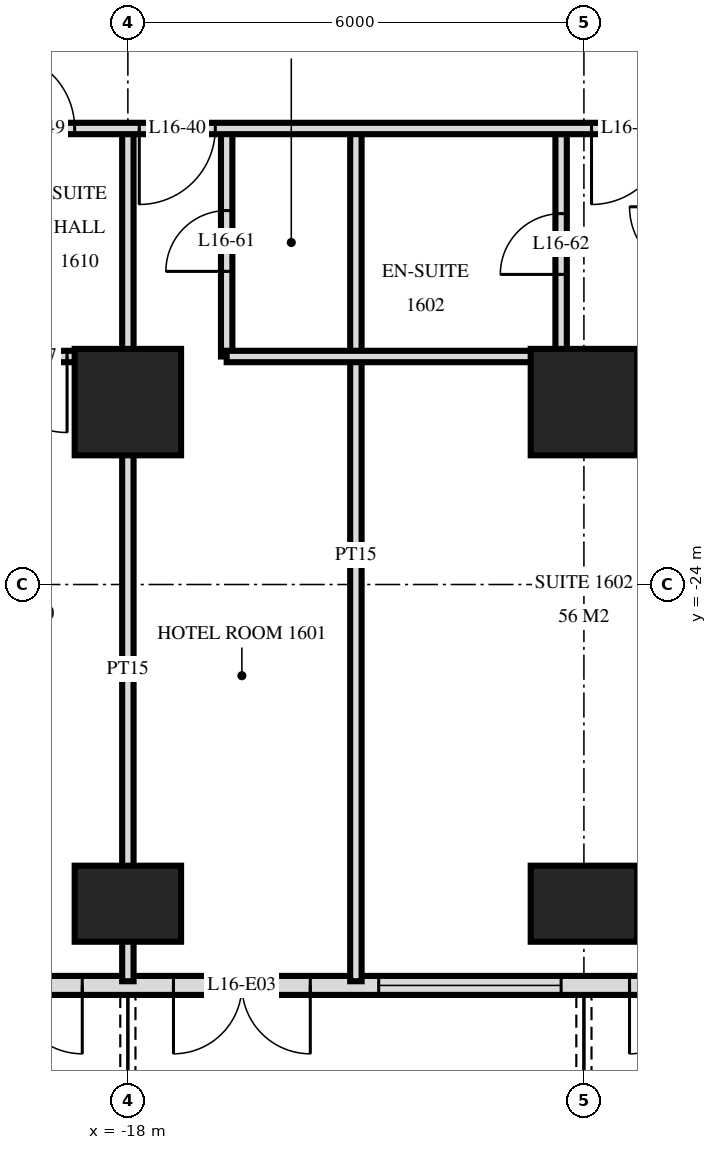
"""IFC4 building model, lengths in metres.
Left out: names, types, materials, properties, quantities, classifications, styles, units other than length and angle.
Written with IfcOpenShell. Run it as: python <this file> out.ifc"""

import sys

from ifc_helpers import new_model, si_unit, direction, frame, frame_2d, origin, origin_2d, place, context, subcontext, project, spatial, rectangle, extrude, element, fill, save


model = new_model("IFC4")
c1 = context("Model", 3, precision=1e-05, world=origin(), true_north=direction((0.0, 1.0)))
c2 = subcontext(c1, "Body", "Model", "MODEL_VIEW")
j1 = project(units=[si_unit("LENGTHUNIT", "METRE"), si_unit("PLANEANGLEUNIT", "RADIAN")], contexts=[c1])
p1 = place(None, origin())
s1 = spatial("IfcSite", under=j1, at=p1, CompositionType="ELEMENT")
p2 = place(p1, origin())
s2 = spatial("IfcBuilding", under=s1, at=p2, CompositionType="ELEMENT")
p3 = place(p2, frame((0.0, 0.0, 67.2)))
s3 = spatial("IfcBuildingStorey", under=s2, at=p3, CompositionType="ELEMENT", Elevation=67.2)
p4 = place(p3, frame((-18.0, -28.2, 0.0), z_axis=(0.0, 0.0, 1.0), x_axis=(1.0, 0.0, 0.0)))
e1 = element("IfcColumn", 1, at=p4, inside=s3, PredefinedType="COLUMN", context=c2, shape_type="SweptSolid", body=[
    extrude(rectangle(XDim=1.4, YDim=1.0, at=origin_2d()), origin(), (0.0, 0.0, 1.0), 3.6),
])
p5 = place(p3, frame((-18.0, -21.6, 0.0), z_axis=(0.0, 0.0, 1.0), x_axis=(1.0, 0.0, 0.0)))
e2 = element("IfcColumn", 2, at=p5, inside=s3, PredefinedType="COLUMN", context=c2, shape_type="SweptSolid", body=[
    extrude(rectangle(XDim=1.4, YDim=1.4, at=origin_2d()), origin(), (0.0, 0.0, 1.0), 3.6),
])
p6 = place(p3, frame((-12.0, -28.2, 0.0), z_axis=(0.0, 0.0, 1.0), x_axis=(1.0, 0.0, 0.0)))
e3 = element("IfcColumn", 3, at=p6, inside=s3, PredefinedType="COLUMN", context=c2, shape_type="SweptSolid", body=[
    extrude(rectangle(XDim=1.4, YDim=1.0, at=origin_2d()), origin(), (0.0, 0.0, 1.0), 3.6),
])
p7 = place(p3, frame((-12.0, -21.6, 0.0), z_axis=(0.0, 0.0, 1.0), x_axis=(1.0, 0.0, 0.0)))
e4 = element("IfcColumn", 4, at=p7, inside=s3, PredefinedType="COLUMN", context=c2, shape_type="SweptSolid", body=[
    extrude(rectangle(XDim=1.4, YDim=1.4, at=origin_2d()), origin(), (0.0, 0.0, 1.0), 3.6),
])
p8 = place(p3, frame((-28.775, -29.275, 0.0), z_axis=(0.0, 0.0, 1.0), x_axis=(1.0, 0.0, 0.0)))
e5 = element("IfcWall", 5, at=p8, inside=s3, PredefinedType="SOLIDWALL", context=c2, shape_type="SweptSolid", body=[
    extrude(rectangle(XDim=57.551, YDim=0.25, at=frame_2d((28.775, 0.0))), origin(), (0.0, 0.0, 1.0), 3.32),
])
p9 = place(p8, frame((0.575, 0.0, 0.0)))
e6 = element("IfcOpeningElement", 6, at=p9, cuts=e5, PredefinedType="OPENING", context=c2, shape_type="SweptSolid", body=[
    extrude(rectangle(XDim=1.8, YDim=2.4, at=frame_2d((0.9, 1.2))), frame((0.0, 0.135, 0.0), z_axis=(0.0, -1.0, 0.0), x_axis=(1.0, 0.0, 0.0)), (0.0, 0.0, 1.0), 0.27),
])
p10 = place(p8, frame((5.075, 0.0, 0.3)))
e7 = element("IfcOpeningElement", 7, at=p10, cuts=e5, PredefinedType="OPENING", context=c2, shape_type="SweptSolid", body=[
    extrude(rectangle(XDim=2.4, YDim=2.1, at=frame_2d((1.2, 1.05))), frame((0.0, 0.135, 0.0), z_axis=(0.0, -1.0, 0.0), x_axis=(1.0, 0.0, 0.0)), (0.0, 0.0, 1.0), 0.27),
])
p11 = place(p8, frame((8.375, 0.0, 0.0)))
e8 = element("IfcOpeningElement", 8, at=p11, cuts=e5, PredefinedType="OPENING", context=c2, shape_type="SweptSolid", body=[
    extrude(rectangle(XDim=1.8, YDim=2.4, at=frame_2d((0.9, 1.2))), frame((0.0, 0.135, 0.0), z_axis=(0.0, -1.0, 0.0), x_axis=(1.0, 0.0, 0.0)), (0.0, 0.0, 1.0), 0.27),
])
p12 = place(p8, frame((11.375, 0.0, 0.0)))
e9 = element("IfcOpeningElement", 9, at=p12, cuts=e5, PredefinedType="OPENING", context=c2, shape_type="SweptSolid", body=[
    extrude(rectangle(XDim=1.8, YDim=2.4, at=frame_2d((0.9, 1.2))), frame((0.0, 0.135, 0.0), z_axis=(0.0, -1.0, 0.0), x_axis=(1.0, 0.0, 0.0)), (0.0, 0.0, 1.0), 0.27),
])
p13 = place(p8, frame((14.075, 0.0, 0.3)))
e10 = element("IfcOpeningElement", 10, at=p13, cuts=e5, PredefinedType="OPENING", context=c2, shape_type="SweptSolid", body=[
    extrude(rectangle(XDim=2.4, YDim=2.1, at=frame_2d((1.2, 1.05))), frame((0.0, 0.135, 0.0), z_axis=(0.0, -1.0, 0.0), x_axis=(1.0, 0.0, 0.0)), (0.0, 0.0, 1.0), 0.27),
])
p14 = place(p8, frame((17.375, 0.0, 0.0)))
e11 = element("IfcOpeningElement", 11, at=p14, cuts=e5, PredefinedType="OPENING", context=c2, shape_type="SweptSolid", body=[
    extrude(rectangle(XDim=1.8, YDim=2.4, at=frame_2d((0.9, 1.2))), frame((0.0, 0.135, 0.0), z_axis=(0.0, -1.0, 0.0), x_axis=(1.0, 0.0, 0.0)), (0.0, 0.0, 1.0), 0.27),
])
p15 = place(p8, frame((20.075, 0.0, 0.3)))
e12 = element("IfcOpeningElement", 12, at=p15, cuts=e5, PredefinedType="OPENING", context=c2, shape_type="SweptSolid", body=[
    extrude(rectangle(XDim=2.4, YDim=2.1, at=frame_2d((1.2, 1.05))), frame((0.0, 0.135, 0.0), z_axis=(0.0, -1.0, 0.0), x_axis=(1.0, 0.0, 0.0)), (0.0, 0.0, 1.0), 0.27),
])
p16 = place(p8, frame((23.075, 0.0, 0.3)))
e13 = element("IfcOpeningElement", 13, at=p16, cuts=e5, PredefinedType="OPENING", context=c2, shape_type="SweptSolid", body=[
    extrude(rectangle(XDim=2.4, YDim=2.1, at=frame_2d((1.2, 1.05))), frame((0.0, 0.135, 0.0), z_axis=(0.0, -1.0, 0.0), x_axis=(1.0, 0.0, 0.0)), (0.0, 0.0, 1.0), 0.27),
])
p17 = place(p8, frame((26.375, 0.0, 0.0)))
e14 = element("IfcOpeningElement", 14, at=p17, cuts=e5, PredefinedType="OPENING", context=c2, shape_type="SweptSolid", body=[
    extrude(rectangle(XDim=1.8, YDim=2.4, at=frame_2d((0.9, 1.2))), frame((0.0, 0.135, 0.0), z_axis=(0.0, -1.0, 0.0), x_axis=(1.0, 0.0, 0.0)), (0.0, 0.0, 1.0), 0.27),
])
p18 = place(p8, frame((29.375, 0.0, 0.0)))
e15 = element("IfcOpeningElement", 15, at=p18, cuts=e5, PredefinedType="OPENING", context=c2, shape_type="SweptSolid", body=[
    extrude(rectangle(XDim=1.8, YDim=2.4, at=frame_2d((0.9, 1.2))), frame((0.0, 0.135, 0.0), z_axis=(0.0, -1.0, 0.0), x_axis=(1.0, 0.0, 0.0)), (0.0, 0.0, 1.0), 0.27),
])
p19 = place(p8, frame((32.075, 0.0, 0.3)))
e16 = element("IfcOpeningElement", 16, at=p19, cuts=e5, PredefinedType="OPENING", context=c2, shape_type="SweptSolid", body=[
    extrude(rectangle(XDim=2.4, YDim=2.1, at=frame_2d((1.2, 1.05))), frame((0.0, 0.135, 0.0), z_axis=(0.0, -1.0, 0.0), x_axis=(1.0, 0.0, 0.0)), (0.0, 0.0, 1.0), 0.27),
])
p20 = place(p8, frame((35.375, 0.0, 0.0)))
e17 = element("IfcOpeningElement", 17, at=p20, cuts=e5, PredefinedType="OPENING", context=c2, shape_type="SweptSolid", body=[
    extrude(rectangle(XDim=1.8, YDim=2.4, at=frame_2d((0.9, 1.2))), frame((0.0, 0.135, 0.0), z_axis=(0.0, -1.0, 0.0), x_axis=(1.0, 0.0, 0.0)), (0.0, 0.0, 1.0), 0.27),
])
p21 = place(p8, frame((38.075, 0.0, 0.3)))
e18 = element("IfcOpeningElement", 18, at=p21, cuts=e5, PredefinedType="OPENING", context=c2, shape_type="SweptSolid", body=[
    extrude(rectangle(XDim=2.4, YDim=2.1, at=frame_2d((1.2, 1.05))), frame((0.0, 0.135, 0.0), z_axis=(0.0, -1.0, 0.0), x_axis=(1.0, 0.0, 0.0)), (0.0, 0.0, 1.0), 0.27),
])
p22 = place(p8, frame((41.075, 0.0, 0.3)))
e19 = element("IfcOpeningElement", 19, at=p22, cuts=e5, PredefinedType="OPENING", context=c2, shape_type="SweptSolid", body=[
    extrude(rectangle(XDim=2.4, YDim=2.1, at=frame_2d((1.2, 1.05))), frame((0.0, 0.135, 0.0), z_axis=(0.0, -1.0, 0.0), x_axis=(1.0, 0.0, 0.0)), (0.0, 0.0, 1.0), 0.27),
])
p23 = place(p8, frame((44.375, 0.0, 0.0)))
e20 = element("IfcOpeningElement", 20, at=p23, cuts=e5, PredefinedType="OPENING", context=c2, shape_type="SweptSolid", body=[
    extrude(rectangle(XDim=1.8, YDim=2.4, at=frame_2d((0.9, 1.2))), frame((0.0, 0.135, 0.0), z_axis=(0.0, -1.0, 0.0), x_axis=(1.0, 0.0, 0.0)), (0.0, 0.0, 1.0), 0.27),
])
p24 = place(p8, frame((47.075, 0.0, 0.3)))
e21 = element("IfcOpeningElement", 21, at=p24, cuts=e5, PredefinedType="OPENING", context=c2, shape_type="SweptSolid", body=[
    extrude(rectangle(XDim=2.4, YDim=2.1, at=frame_2d((1.2, 1.05))), frame((0.0, 0.135, 0.0), z_axis=(0.0, -1.0, 0.0), x_axis=(1.0, 0.0, 0.0)), (0.0, 0.0, 1.0), 0.27),
])
p25 = place(p8, frame((50.375, 0.0, 0.0)))
e22 = element("IfcOpeningElement", 22, at=p25, cuts=e5, PredefinedType="OPENING", context=c2, shape_type="SweptSolid", body=[
    extrude(rectangle(XDim=1.8, YDim=2.4, at=frame_2d((0.9, 1.2))), frame((0.0, 0.135, 0.0), z_axis=(0.0, -1.0, 0.0), x_axis=(1.0, 0.0, 0.0)), (0.0, 0.0, 1.0), 0.27),
])
p26 = place(p8, frame((53.375, 0.0, 0.0)))
e23 = element("IfcOpeningElement", 23, at=p26, cuts=e5, PredefinedType="OPENING", context=c2, shape_type="SweptSolid", body=[
    extrude(rectangle(XDim=1.8, YDim=2.4, at=frame_2d((0.9, 1.2))), frame((0.0, 0.135, 0.0), z_axis=(0.0, -1.0, 0.0), x_axis=(1.0, 0.0, 0.0)), (0.0, 0.0, 1.0), 0.27),
])
p27 = place(p3, frame((-12.3, -21.0, 0.0), z_axis=(0.0, 0.0, 1.0), x_axis=(0.0, 1.0, 0.0)))
e24 = element("IfcWall", 24, at=p27, inside=s3, PredefinedType="PARTITIONING", context=c2, shape_type="SweptSolid", body=[
    extrude(rectangle(XDim=3.0, YDim=0.15, at=frame_2d((1.5, 0.0))), origin(), (0.0, 0.0, 1.0), 3.32),
])
p28 = place(p27, frame((1.08, 0.0, 0.0)))
e25 = element("IfcOpeningElement", 25, at=p28, cuts=e24, PredefinedType="OPENING", context=c2, shape_type="SweptSolid", body=[
    extrude(rectangle(XDim=0.8, YDim=2.1, at=frame_2d((0.4, 1.05))), frame((0.0, 0.085, 0.0), z_axis=(0.0, -1.0, 0.0), x_axis=(1.0, 0.0, 0.0)), (0.0, 0.0, 1.0), 0.17),
])
p29 = place(p3, frame((-15.0, -29.22, 0.0), z_axis=(0.0, 0.0, 1.0), x_axis=(0.0, 1.0, 0.0)))
e26 = element("IfcWall", 26, at=p29, inside=s3, PredefinedType="PARTITIONING", context=c2, shape_type="SweptSolid", body=[
    extrude(rectangle(XDim=11.22, YDim=0.15, at=frame_2d((5.61, 0.0))), origin(), (0.0, 0.0, 1.0), 3.32),
])
p30 = place(p3, frame((-16.7, -21.0, 0.0), z_axis=(0.0, 0.0, 1.0), x_axis=(0.0, 1.0, 0.0)))
e27 = element("IfcWall", 27, at=p30, inside=s3, PredefinedType="PARTITIONING", context=c2, shape_type="SweptSolid", body=[
    extrude(rectangle(XDim=3.0, YDim=0.15, at=frame_2d((1.5, 0.0))), origin(), (0.0, 0.0, 1.0), 3.32),
])
p31 = place(p30, frame((1.12, 0.0, 0.0)))
e28 = element("IfcOpeningElement", 28, at=p31, cuts=e27, PredefinedType="OPENING", context=c2, shape_type="SweptSolid", body=[
    extrude(rectangle(XDim=0.8, YDim=2.1, at=frame_2d((0.4, 1.05))), frame((0.0, 0.085, 0.0), z_axis=(0.0, -1.0, 0.0), x_axis=(1.0, 0.0, 0.0)), (0.0, 0.0, 1.0), 0.17),
])
p32 = place(p3, frame((-18.0, -21.0, 0.0), z_axis=(0.0, 0.0, 1.0), x_axis=(0.0, 1.0, 0.0)))
e29 = element("IfcWall", 29, at=p32, inside=s3, PredefinedType="PARTITIONING", context=c2, shape_type="SweptSolid", body=[
    extrude(rectangle(XDim=3.0, YDim=0.15, at=frame_2d((1.5, 0.0))), origin(), (0.0, 0.0, 1.0), 3.32),
])
p33 = place(p3, frame((-18.0, -29.22, 0.0), z_axis=(0.0, 0.0, 1.0), x_axis=(0.0, 1.0, 0.0)))
e30 = element("IfcWall", 30, at=p33, inside=s3, PredefinedType="PARTITIONING", context=c2, shape_type="SweptSolid", body=[
    extrude(rectangle(XDim=8.22, YDim=0.15, at=frame_2d((4.11, 0.0))), origin(), (0.0, 0.0, 1.0), 3.32),
])
p34 = place(p3, frame((-20.4, -21.0, 0.0), z_axis=(0.0, 0.0, 1.0), x_axis=(1.0, 0.0, 0.0)))
e31 = element("IfcWall", 31, at=p34, inside=s3, PredefinedType="PARTITIONING", context=c2, shape_type="SweptSolid", body=[
    extrude(rectangle(XDim=2.4, YDim=0.15, at=frame_2d((1.2, 0.0))), origin(), (0.0, 0.0, 1.0), 3.32),
])
p35 = place(p34, frame((0.6, 0.0, 0.0)))
e32 = element("IfcOpeningElement", 32, at=p35, cuts=e31, PredefinedType="OPENING", context=c2, shape_type="SweptSolid", body=[
    extrude(rectangle(XDim=1.0, YDim=2.1, at=frame_2d((0.5, 1.05))), frame((0.0, 0.085, 0.0), z_axis=(0.0, -1.0, 0.0), x_axis=(1.0, 0.0, 0.0)), (0.0, 0.0, 1.0), 0.17),
])
p36 = place(p3, frame((-16.7, -21.0, 0.0), z_axis=(0.0, 0.0, 1.0), x_axis=(1.0, 0.0, 0.0)))
e33 = element("IfcWall", 33, at=p36, inside=s3, PredefinedType="PARTITIONING", context=c2, shape_type="SweptSolid", body=[
    extrude(rectangle(XDim=4.4, YDim=0.15, at=frame_2d((2.2, 0.0))), origin(), (0.0, 0.0, 1.0), 3.32),
])
p37 = place(p3, frame((-33.12, -18.0, 0.0), z_axis=(0.0, 0.0, 1.0), x_axis=(1.0, 0.0, 0.0)))
e34 = element("IfcWall", 34, at=p37, inside=s3, PredefinedType="PARTITIONING", context=c2, shape_type="SweptSolid", body=[
    extrude(rectangle(XDim=66.24, YDim=0.15, at=frame_2d((33.12, 0.0))), origin(), (0.0, 0.0, 1.0), 3.32),
])
p38 = place(p37, frame((15.27, 0.0, 0.0)))
e35 = element("IfcOpeningElement", 35, at=p38, cuts=e34, PredefinedType="OPENING", context=c2, shape_type="SweptSolid", body=[
    extrude(rectangle(XDim=1.0, YDim=2.1, at=frame_2d((0.5, 1.05))), frame((0.0, 0.085, 0.0), z_axis=(0.0, -1.0, 0.0), x_axis=(1.0, 0.0, 0.0)), (0.0, 0.0, 1.0), 0.17),
])
p39 = place(p37, frame((21.22, 0.0, 0.0)))
e36 = element("IfcOpeningElement", 36, at=p39, cuts=e34, PredefinedType="OPENING", context=c2, shape_type="SweptSolid", body=[
    extrude(rectangle(XDim=1.0, YDim=2.1, at=frame_2d((0.5, 1.05))), frame((0.0, 0.085, 0.0), z_axis=(0.0, -1.0, 0.0), x_axis=(1.0, 0.0, 0.0)), (0.0, 0.0, 1.0), 0.17),
])
p40 = place(p37, frame((24.27, 0.0, 0.0)))
e37 = element("IfcOpeningElement", 37, at=p40, cuts=e34, PredefinedType="OPENING", context=c2, shape_type="SweptSolid", body=[
    extrude(rectangle(XDim=1.0, YDim=2.1, at=frame_2d((0.5, 1.05))), frame((0.0, 0.085, 0.0), z_axis=(0.0, -1.0, 0.0), x_axis=(1.0, 0.0, 0.0)), (0.0, 0.0, 1.0), 0.17),
])
p41 = place(p37, frame((30.97, 0.0, 0.0)))
e38 = element("IfcOpeningElement", 38, at=p41, cuts=e34, PredefinedType="OPENING", context=c2, shape_type="SweptSolid", body=[
    extrude(rectangle(XDim=1.0, YDim=2.1, at=frame_2d((0.5, 1.05))), frame((0.0, 0.085, 0.0), z_axis=(0.0, -1.0, 0.0), x_axis=(1.0, 0.0, 0.0)), (0.0, 0.0, 1.0), 0.17),
])
p42 = place(p37, frame((40.42, 0.0, 0.0)))
e39 = element("IfcOpeningElement", 39, at=p42, cuts=e34, PredefinedType="OPENING", context=c2, shape_type="SweptSolid", body=[
    extrude(rectangle(XDim=1.0, YDim=2.1, at=frame_2d((0.5, 1.05))), frame((0.0, 0.085, 0.0), z_axis=(0.0, -1.0, 0.0), x_axis=(1.0, 0.0, 0.0)), (0.0, 0.0, 1.0), 0.17),
])
p43 = place(p37, frame((43.97, 0.0, 0.0)))
e40 = element("IfcOpeningElement", 40, at=p43, cuts=e34, PredefinedType="OPENING", context=c2, shape_type="SweptSolid", body=[
    extrude(rectangle(XDim=1.0, YDim=2.1, at=frame_2d((0.5, 1.05))), frame((0.0, 0.085, 0.0), z_axis=(0.0, -1.0, 0.0), x_axis=(1.0, 0.0, 0.0)), (0.0, 0.0, 1.0), 0.17),
])
p44 = place(p37, frame((45.52, 0.0, 0.0)))
e41 = element("IfcOpeningElement", 41, at=p44, cuts=e34, PredefinedType="OPENING", context=c2, shape_type="SweptSolid", body=[
    extrude(rectangle(XDim=1.0, YDim=2.1, at=frame_2d((0.5, 1.05))), frame((0.0, 0.085, 0.0), z_axis=(0.0, -1.0, 0.0), x_axis=(1.0, 0.0, 0.0)), (0.0, 0.0, 1.0), 0.17),
])
p45 = place(p37, frame((52.97, 0.0, 0.0)))
e42 = element("IfcOpeningElement", 42, at=p45, cuts=e34, PredefinedType="OPENING", context=c2, shape_type="SweptSolid", body=[
    extrude(rectangle(XDim=1.0, YDim=2.1, at=frame_2d((0.5, 1.05))), frame((0.0, 0.085, 0.0), z_axis=(0.0, -1.0, 0.0), x_axis=(1.0, 0.0, 0.0)), (0.0, 0.0, 1.0), 0.17),
])
p46 = place(p37, frame((54.27, 0.0, 0.0)))
e43 = element("IfcOpeningElement", 43, at=p46, cuts=e34, PredefinedType="OPENING", context=c2, shape_type="SweptSolid", body=[
    extrude(rectangle(XDim=1.0, YDim=2.1, at=frame_2d((0.5, 1.05))), frame((0.0, 0.085, 0.0), z_axis=(0.0, -1.0, 0.0), x_axis=(1.0, 0.0, 0.0)), (0.0, 0.0, 1.0), 0.17),
])
p47 = place(p37, frame((13.42, 0.0, 0.0)))
e44 = element("IfcOpeningElement", 44, at=p47, cuts=e34, PredefinedType="OPENING", context=c2, shape_type="SweptSolid", body=[
    extrude(rectangle(XDim=1.0, YDim=2.1, at=frame_2d((0.5, 1.05))), frame((0.0, 0.085, 0.0), z_axis=(0.0, -1.0, 0.0), x_axis=(1.0, 0.0, 0.0)), (0.0, 0.0, 1.0), 0.17),
])
p48 = place(p37, frame((60.82, 0.0, 0.0)))
e45 = element("IfcOpeningElement", 45, at=p48, cuts=e34, PredefinedType="OPENING", context=c2, shape_type="SweptSolid", body=[
    extrude(rectangle(XDim=1.0, YDim=2.1, at=frame_2d((0.5, 1.05))), frame((0.0, 0.085, 0.0), z_axis=(0.0, -1.0, 0.0), x_axis=(1.0, 0.0, 0.0)), (0.0, 0.0, 1.0), 0.17),
])
p49 = place(p11, frame((0.9, 0.0, 0.0), z_axis=(0.0, 0.0, 1.0), x_axis=(-1.0, 0.0, 0.0)))
e46 = element("IfcDoor", 46, at=p49, inside=s3, OperationType="DOUBLE_DOOR_SINGLE_SWING", PredefinedType="DOOR", context=c2, shape_type="SweptSolid", body=[
    extrude(rectangle(XDim=1.8, YDim=2.4, at=frame_2d((0.0, 1.2))), frame((0.0, -0.025, 0.0), z_axis=(0.0, 1.0, 0.0), x_axis=(-1.0, 0.0, 0.0)), (0.0, 0.0, 1.0), 0.05),
])
fill(e8, e46)
p50 = place(p12, frame((0.9, 0.0, 0.0), z_axis=(0.0, 0.0, 1.0), x_axis=(-1.0, 0.0, 0.0)))
e47 = element("IfcDoor", 47, at=p50, inside=s3, OperationType="DOUBLE_DOOR_SINGLE_SWING", PredefinedType="DOOR", context=c2, shape_type="SweptSolid", body=[
    extrude(rectangle(XDim=1.8, YDim=2.4, at=frame_2d((0.0, 1.2))), frame((0.0, -0.025, 0.0), z_axis=(0.0, 1.0, 0.0), x_axis=(-1.0, 0.0, 0.0)), (0.0, 0.0, 1.0), 0.05),
])
fill(e9, e47)
p51 = place(p13, origin())
e48 = element("IfcWindow", 48, at=p51, inside=s3, PartitioningType="SINGLE_PANEL", PredefinedType="WINDOW", context=c2, shape_type="SweptSolid", body=[
    extrude(rectangle(XDim=2.4, YDim=2.1, at=frame_2d((1.2, 1.05))), frame((0.0, 0.03, 0.0), z_axis=(0.0, -1.0, 0.0), x_axis=(1.0, 0.0, 0.0)), (0.0, 0.0, 1.0), 0.06),
])
fill(e10, e48)
p52 = place(p14, frame((0.9, 0.0, 0.0), z_axis=(0.0, 0.0, 1.0), x_axis=(-1.0, 0.0, 0.0)))
e49 = element("IfcDoor", 49, at=p52, inside=s3, OperationType="DOUBLE_DOOR_SINGLE_SWING", PredefinedType="DOOR", context=c2, shape_type="SweptSolid", body=[
    extrude(rectangle(XDim=1.8, YDim=2.4, at=frame_2d((0.0, 1.2))), frame((0.0, -0.025, 0.0), z_axis=(0.0, 1.0, 0.0), x_axis=(-1.0, 0.0, 0.0)), (0.0, 0.0, 1.0), 0.05),
])
fill(e11, e49)
p53 = place(p38, frame((0.5, 0.0, 0.0), z_axis=(0.0, 0.0, 1.0), x_axis=(-1.0, 0.0, 0.0)))
e50 = element("IfcDoor", 50, at=p53, inside=s3, OperationType="SINGLE_SWING_LEFT", PredefinedType="DOOR", context=c2, shape_type="SweptSolid", body=[
    extrude(rectangle(XDim=1.0, YDim=2.1, at=frame_2d((0.0, 1.05))), frame((0.0, -0.025, 0.0), z_axis=(0.0, 1.0, 0.0), x_axis=(-1.0, 0.0, 0.0)), (0.0, 0.0, 1.0), 0.05),
])
fill(e35, e50)
p54 = place(p39, frame((0.5, 0.0, 0.0), z_axis=(0.0, 0.0, 1.0), x_axis=(-1.0, 0.0, 0.0)))
e51 = element("IfcDoor", 51, at=p54, inside=s3, OperationType="SINGLE_SWING_LEFT", PredefinedType="DOOR", context=c2, shape_type="SweptSolid", body=[
    extrude(rectangle(XDim=1.0, YDim=2.1, at=frame_2d((0.0, 1.05))), frame((0.0, -0.025, 0.0), z_axis=(0.0, 1.0, 0.0), x_axis=(-1.0, 0.0, 0.0)), (0.0, 0.0, 1.0), 0.05),
])
fill(e36, e51)
p55 = place(p47, origin())
e52 = element("IfcDoor", 52, at=p55, inside=s3, OperationType="SINGLE_SWING_RIGHT", PredefinedType="DOOR", context=c2, shape_type="SweptSolid", body=[
    extrude(rectangle(XDim=1.0, YDim=2.1, at=frame_2d((0.5, 1.05))), frame((0.0, 0.025, 0.0), z_axis=(0.0, -1.0, 0.0), x_axis=(1.0, 0.0, 0.0)), (0.0, 0.0, 1.0), 0.05),
])
fill(e44, e52)
p56 = place(p31, origin())
e53 = element("IfcDoor", 53, at=p56, inside=s3, OperationType="SINGLE_SWING_RIGHT", PredefinedType="DOOR", context=c2, shape_type="SweptSolid", body=[
    extrude(rectangle(XDim=0.8, YDim=2.1, at=frame_2d((0.4, 1.05))), frame((0.0, 0.025, 0.0), z_axis=(0.0, -1.0, 0.0), x_axis=(1.0, 0.0, 0.0)), (0.0, 0.0, 1.0), 0.05),
])
fill(e28, e53)
p57 = place(p28, origin())
e54 = element("IfcDoor", 54, at=p57, inside=s3, OperationType="SINGLE_SWING_RIGHT", PredefinedType="DOOR", context=c2, shape_type="SweptSolid", body=[
    extrude(rectangle(XDim=0.8, YDim=2.1, at=frame_2d((0.4, 1.05))), frame((0.0, 0.025, 0.0), z_axis=(0.0, -1.0, 0.0), x_axis=(1.0, 0.0, 0.0)), (0.0, 0.0, 1.0), 0.05),
])
fill(e25, e54)
p58 = place(p35, frame((0.5, 0.0, 0.0), z_axis=(0.0, 0.0, 1.0), x_axis=(-1.0, 0.0, 0.0)))
e55 = element("IfcDoor", 55, at=p58, inside=s3, OperationType="SINGLE_SWING_RIGHT", PredefinedType="DOOR", context=c2, shape_type="SweptSolid", body=[
    extrude(rectangle(XDim=1.0, YDim=2.1, at=frame_2d((0.0, 1.05))), frame((0.0, -0.025, 0.0), z_axis=(0.0, 1.0, 0.0), x_axis=(-1.0, 0.0, 0.0)), (0.0, 0.0, 1.0), 0.05),
])
fill(e32, e55)
save(model, sys.argv[1])
